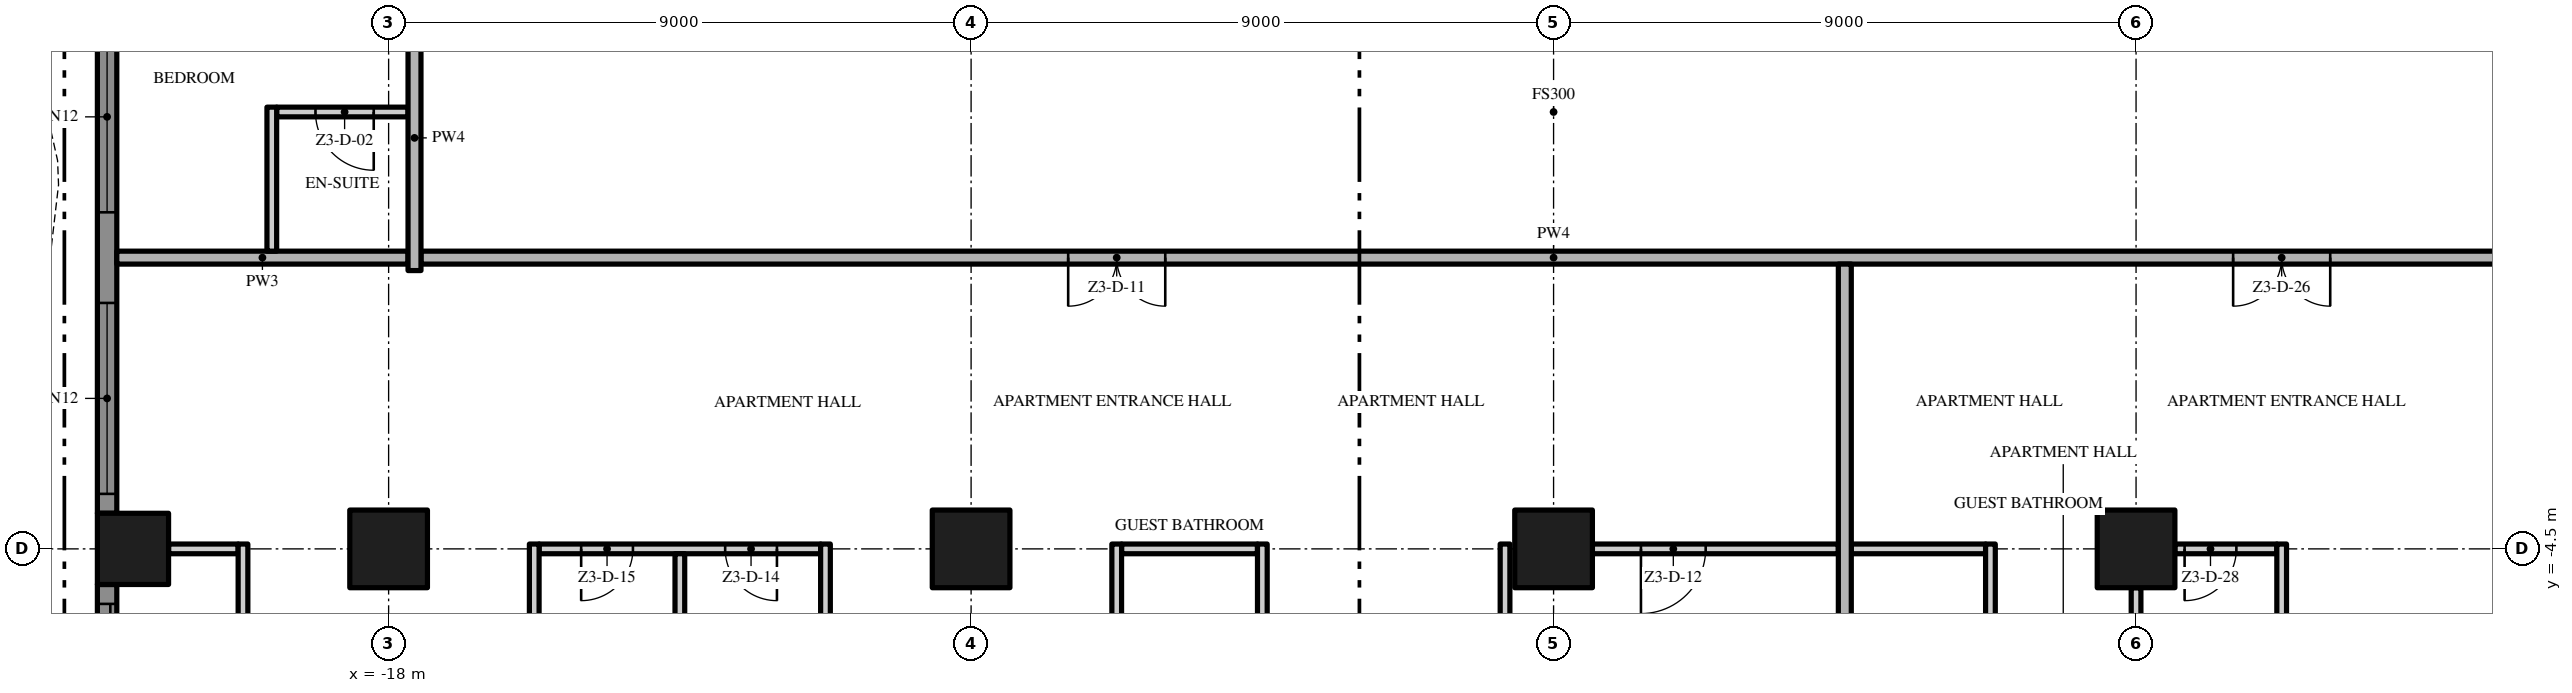
"""IFC4 building model, lengths in metres.
Left out: names, types, materials, properties, quantities, classifications, styles, units other than length and angle.
Written with IfcOpenShell. Run it as: python <this file> out.ifc"""

import sys

from ifc_helpers import new_model, si_unit, direction, frame, frame_2d, origin, origin_2d, place, context, subcontext, project, spatial, polyline, rectangle, outline, extrude, element, fill, save


model = new_model("IFC4")
c1 = context("Model", 3, precision=1e-05, world=origin(), true_north=direction((0.0, 1.0)))
c2 = subcontext(c1, "Body", "Model", "MODEL_VIEW")
j1 = project(units=[si_unit("LENGTHUNIT", "METRE"), si_unit("PLANEANGLEUNIT", "RADIAN")], contexts=[c1])
p1 = place(None, origin())
s1 = spatial("IfcSite", under=j1, at=p1, CompositionType="ELEMENT")
p2 = place(p1, origin())
s2 = spatial("IfcBuilding", under=s1, at=p2, CompositionType="ELEMENT")
p3 = place(p2, frame((0.0, 0.0, 163.0)))
s3 = spatial("IfcBuildingStorey", under=s2, at=p3, CompositionType="ELEMENT", Elevation=163.0)
p4 = place(p3, frame((-18.0, -4.5, 0.0), z_axis=(0.0, 0.0, 1.0), x_axis=(1.0, 0.0, 0.0)))
e1 = element("IfcColumn", 1, at=p4, inside=s3, PredefinedType="COLUMN", context=c2, shape_type="SweptSolid", body=[
    extrude(rectangle(XDim=1.2, YDim=1.2, at=origin_2d()), origin(), (0.0, 0.0, 1.0), 3.5),
])
p5 = place(p3, frame((-21.95, -4.5, 0.0), z_axis=(0.0, 0.0, 1.0), x_axis=(1.0, 0.0, 0.0)))
e2 = element("IfcColumn", 2, at=p5, inside=s3, PredefinedType="COLUMN", context=c2, shape_type="SweptSolid", body=[
    extrude(rectangle(XDim=1.1, YDim=1.1, at=origin_2d()), origin(), (0.0, 0.0, 1.0), 3.5),
])
for number, where, z_axis, x_axis in (
    (3, (-9.0, -4.5, 0.0), (0.0, 0.0, 1.0), (1.0, 0.0, 0.0)),
    (4, (0.0, -4.5, 0.0), (0.0, 0.0, 1.0), (1.0, 0.0, 0.0)),
    (5, (9.0, -4.5, 0.0), (0.0, 0.0, 1.0), (1.0, 0.0, 0.0)),
):
    element("IfcColumn", number, at=place(p3, frame(where, z_axis=z_axis, x_axis=x_axis)), inside=s3, PredefinedType="COLUMN", context=c2, shape_type="SweptSolid", body=[
        extrude(rectangle(XDim=1.2, YDim=1.2, at=origin_2d()), origin(), (0.0, 0.0, 1.0), 3.5),
    ])
p6 = place(p3, frame((-22.35, -3.95, 0.0), z_axis=(0.0, 0.0, 1.0), x_axis=(0.0, 1.0, 0.0)))
e6 = element("IfcWall", 6, at=p6, inside=s3, PredefinedType="SOLIDWALL", context=c2, shape_type="SweptSolid", body=[
    extrude(rectangle(XDim=7.9, YDim=0.3, at=frame_2d((3.95, 0.0))), origin(), (0.0, 0.0, 1.0), 3.5),
])
p7 = place(p6, frame((4.65, 0.0, 0.45)))
e7 = element("IfcOpeningElement", 7, at=p7, cuts=e6, PredefinedType="OPENING", context=c2, shape_type="SweptSolid", body=[
    extrude(rectangle(XDim=2.95, YDim=2.65, at=frame_2d((1.475, 1.325))), frame((0.0, 0.16, 0.0), z_axis=(0.0, -1.0, 0.0), x_axis=(1.0, 0.0, 0.0)), (0.0, 0.0, 1.0), 0.32),
])
p8 = place(p6, frame((0.3, 0.0, 0.45)))
e8 = element("IfcOpeningElement", 8, at=p8, cuts=e6, PredefinedType="OPENING", context=c2, shape_type="SweptSolid", body=[
    extrude(rectangle(XDim=2.95, YDim=2.65, at=frame_2d((1.475, 1.325))), frame((0.0, 0.16, 0.0), z_axis=(0.0, -1.0, 0.0), x_axis=(1.0, 0.0, 0.0)), (0.0, 0.0, 1.0), 0.32),
])
p9 = place(p3, frame((-22.35, -12.4, 0.0), z_axis=(0.0, 0.0, 1.0), x_axis=(0.0, 1.0, 0.0)))
e9 = element("IfcWall", 9, at=p9, inside=s3, PredefinedType="SOLIDWALL", context=c2, shape_type="SweptSolid", body=[
    extrude(rectangle(XDim=7.35, YDim=0.3, at=frame_2d((3.675, 0.0))), origin(), (0.0, 0.0, 1.0), 3.5),
])
p10 = place(p9, frame((4.1, 0.0, 0.0)))
e10 = element("IfcOpeningElement", 10, at=p10, cuts=e9, PredefinedType="OPENING", context=c2, shape_type="SweptSolid", body=[
    extrude(rectangle(XDim=2.95, YDim=2.4, at=frame_2d((1.475, 1.2))), frame((0.0, 0.16, 0.0), z_axis=(0.0, -1.0, 0.0), x_axis=(1.0, 0.0, 0.0)), (0.0, 0.0, 1.0), 0.32),
])
p11 = place(p9, frame((0.3, 0.0, 0.45)))
e11 = element("IfcOpeningElement", 11, at=p11, cuts=e9, PredefinedType="OPENING", context=c2, shape_type="SweptSolid", body=[
    extrude(rectangle(XDim=2.4, YDim=2.65, at=frame_2d((1.2, 1.325))), frame((0.0, 0.16, 0.0), z_axis=(0.0, -1.0, 0.0), x_axis=(1.0, 0.0, 0.0)), (0.0, 0.0, 1.0), 0.32),
])
p12 = place(p3, origin())
e12 = element("IfcWall", 12, at=p12, inside=s3, PredefinedType="USERDEFINED", context=c2, shape_type="SweptSolid", body=[
    extrude(outline(polyline([(-23.451, 18.0), (-23.115, 16.5), (-23.1, 16.125), (-23.231, 15.0), (-23.755, 13.5), (-24.488, 12.0), (-25.149, 10.5), (-25.485, 9.0), (-25.5, 8.625), (-25.369, 7.5), (-24.845, 6.0), (-24.112, 4.5), (-23.451, 3.0), (-23.115, 1.5), (-23.1, 1.125), (-23.231, 0.0), (-23.755, -1.5), (-24.488, -3.0), (-25.149, -4.5), (-25.485, -6.0), (-25.5, -6.375), (-25.369, -7.5), (-24.845, -9.0), (-24.112, -10.5), (-23.451, -12.0), (-23.115, -13.5), (-22.871, -13.445), (-23.213, -11.921), (-23.885, -10.395), (-24.614, -8.904), (-25.124, -7.444), (-25.249, -6.365), (-25.236, -6.033), (-24.91, -4.579), (-24.261, -3.105), (-23.524, -1.596), (-22.986, -0.056), (-22.849, 1.115), (-22.866, 1.533), (-23.213, 3.079), (-23.885, 4.605), (-24.614, 6.096), (-25.124, 7.556), (-25.249, 8.635), (-25.236, 8.967), (-24.91, 10.421), (-24.261, 11.895), (-23.524, 13.404), (-22.986, 14.944), (-22.849, 16.115), (-22.866, 16.533), (-23.208, 18.055), (-23.451, 18.0)])), origin(), (0.0, 0.0, 1.0), 0.9),
])
p13 = place(p3, frame((-21.4, -4.5, 0.0), z_axis=(0.0, 0.0, 1.0), x_axis=(1.0, 0.0, 0.0)))
e13 = element("IfcWall", 13, at=p13, inside=s3, PredefinedType="PARTITIONING", context=c2, shape_type="SweptSolid", body=[
    extrude(rectangle(XDim=1.075, YDim=0.15, at=frame_2d((0.537, 0.0))), origin(), (0.0, 0.0, 1.0), 3.5),
])
p14 = place(p3, frame((-11.325, -4.5, 0.0), z_axis=(0.0, 0.0, 1.0), x_axis=(-1.0, 0.0, 0.0)))
e14 = element("IfcWall", 14, at=p14, inside=s3, PredefinedType="PARTITIONING", context=c2, shape_type="SweptSolid", body=[
    extrude(rectangle(XDim=4.35, YDim=0.15, at=frame_2d((2.175, 0.0))), origin(), (0.0, 0.0, 1.0), 3.5),
])
p15 = place(p14, frame((0.675, 0.0, 0.0)))
e15 = element("IfcOpeningElement", 15, at=p15, cuts=e14, PredefinedType="OPENING", context=c2, shape_type="SweptSolid", body=[
    extrude(rectangle(XDim=0.8, YDim=2.0, at=frame_2d((0.4, 1.0))), frame((0.0, 0.085, 0.0), z_axis=(0.0, -1.0, 0.0), x_axis=(1.0, 0.0, 0.0)), (0.0, 0.0, 1.0), 0.17),
])
p16 = place(p14, frame((2.9, 0.0, 0.0)))
e16 = element("IfcOpeningElement", 16, at=p16, cuts=e14, PredefinedType="OPENING", context=c2, shape_type="SweptSolid", body=[
    extrude(rectangle(XDim=0.8, YDim=2.0, at=frame_2d((0.4, 1.0))), frame((0.0, 0.085, 0.0), z_axis=(0.0, -1.0, 0.0), x_axis=(1.0, 0.0, 0.0)), (0.0, 0.0, 1.0), 0.17),
])
p17 = place(p3, frame((-6.675, -4.5, 0.0), z_axis=(0.0, 0.0, 1.0), x_axis=(1.0, 0.0, 0.0)))
e17 = element("IfcWall", 17, at=p17, inside=s3, PredefinedType="PARTITIONING", context=c2, shape_type="SweptSolid", body=[
    extrude(rectangle(XDim=2.1, YDim=0.15, at=frame_2d((1.05, 0.0))), origin(), (0.0, 0.0, 1.0), 3.5),
])
p18 = place(p3, frame((4.4, -4.5, 0.0), z_axis=(0.0, 0.0, 1.0), x_axis=(-1.0, 0.0, 0.0)))
e18 = element("IfcWall", 18, at=p18, inside=s3, PredefinedType="PARTITIONING", context=c2, shape_type="SweptSolid", body=[
    extrude(rectangle(XDim=3.8, YDim=0.15, at=frame_2d((1.9, 0.0))), origin(), (0.0, 0.0, 1.0), 3.5),
])
p19 = place(p18, frame((2.05, 0.0, 0.0)))
e19 = element("IfcOpeningElement", 19, at=p19, cuts=e18, PredefinedType="OPENING", context=c2, shape_type="SweptSolid", body=[
    extrude(rectangle(XDim=1.0, YDim=2.4, at=frame_2d((0.5, 1.2))), frame((0.0, 0.085, 0.0), z_axis=(0.0, -1.0, 0.0), x_axis=(1.0, 0.0, 0.0)), (0.0, 0.0, 1.0), 0.17),
])
p20 = place(p3, frame((4.6, -4.5, 0.0), z_axis=(0.0, 0.0, 1.0), x_axis=(1.0, 0.0, 0.0)))
e20 = element("IfcWall", 20, at=p20, inside=s3, PredefinedType="PARTITIONING", context=c2, shape_type="SweptSolid", body=[
    extrude(rectangle(XDim=2.075, YDim=0.15, at=frame_2d((1.038, 0.0))), origin(), (0.0, 0.0, 1.0), 3.5),
])
p21 = place(p3, frame((11.175, -4.5, 0.0), z_axis=(0.0, 0.0, 1.0), x_axis=(-1.0, 0.0, 0.0)))
e21 = element("IfcWall", 21, at=p21, inside=s3, PredefinedType="PARTITIONING", context=c2, shape_type="SweptSolid", body=[
    extrude(rectangle(XDim=1.575, YDim=0.15, at=frame_2d((0.787, 0.0))), origin(), (0.0, 0.0, 1.0), 3.5),
])
p22 = place(p21, frame((0.625, 0.0, 0.0)))
e22 = element("IfcOpeningElement", 22, at=p22, cuts=e21, PredefinedType="OPENING", context=c2, shape_type="SweptSolid", body=[
    extrude(rectangle(XDim=0.8, YDim=2.0, at=frame_2d((0.4, 1.0))), frame((0.0, 0.085, 0.0), z_axis=(0.0, -1.0, 0.0), x_axis=(1.0, 0.0, 0.0)), (0.0, 0.0, 1.0), 0.17),
])
p23 = place(p3, frame((17.5, 0.0, 0.0), z_axis=(0.0, 0.0, 1.0), x_axis=(-1.0, 0.0, 0.0)))
e23 = element("IfcWall", 23, at=p23, inside=s3, PredefinedType="PARTITIONING", context=c2, shape_type="SweptSolid", body=[
    extrude(rectangle(XDim=35.0, YDim=0.2, at=frame_2d((17.5, 0.0))), origin(), (0.0, 0.0, 1.0), 3.5),
])
p24 = place(p23, frame((23.5, 0.0, 0.0)))
e24 = element("IfcOpeningElement", 24, at=p24, cuts=e23, PredefinedType="OPENING", context=c2, shape_type="SweptSolid", body=[
    extrude(rectangle(XDim=1.5, YDim=2.4, at=frame_2d((0.75, 1.2))), frame((0.0, 0.11, 0.0), z_axis=(0.0, -1.0, 0.0), x_axis=(1.0, 0.0, 0.0)), (0.0, 0.0, 1.0), 0.22),
])
p25 = place(p23, frame((5.5, 0.0, 0.0)))
e25 = element("IfcOpeningElement", 25, at=p25, cuts=e23, PredefinedType="OPENING", context=c2, shape_type="SweptSolid", body=[
    extrude(rectangle(XDim=1.5, YDim=2.4, at=frame_2d((0.75, 1.2))), frame((0.0, 0.11, 0.0), z_axis=(0.0, -1.0, 0.0), x_axis=(1.0, 0.0, 0.0)), (0.0, 0.0, 1.0), 0.22),
])
p26 = place(p3, frame((-22.2, 0.0, 0.0), z_axis=(0.0, 0.0, 1.0), x_axis=(1.0, 0.0, 0.0)))
e26 = element("IfcWall", 26, at=p26, inside=s3, PredefinedType="PARTITIONING", context=c2, shape_type="SweptSolid", body=[
    extrude(rectangle(XDim=4.5, YDim=0.2, at=frame_2d((2.25, 0.0))), origin(), (0.0, 0.0, 1.0), 3.5),
])
p27 = place(p3, frame((-17.7, 2.25, 0.0), z_axis=(0.0, 0.0, 1.0), x_axis=(-1.0, 0.0, 0.0)))
e27 = element("IfcWall", 27, at=p27, inside=s3, PredefinedType="PARTITIONING", context=c2, shape_type="SweptSolid", body=[
    extrude(rectangle(XDim=2.03, YDim=0.15, at=frame_2d((1.015, 0.0))), origin(), (0.0, 0.0, 1.0), 3.5),
])
p28 = place(p27, frame((0.53, 0.0, 0.0)))
e28 = element("IfcOpeningElement", 28, at=p28, cuts=e27, PredefinedType="OPENING", context=c2, shape_type="SweptSolid", body=[
    extrude(rectangle(XDim=0.9, YDim=2.1, at=frame_2d((0.45, 1.05))), frame((0.0, 0.085, 0.0), z_axis=(0.0, -1.0, 0.0), x_axis=(1.0, 0.0, 0.0)), (0.0, 0.0, 1.0), 0.17),
])
p29 = place(p3, frame((-20.25, -8.925, 0.0), z_axis=(0.0, 0.0, 1.0), x_axis=(0.0, 1.0, 0.0)))
e29 = element("IfcWall", 29, at=p29, inside=s3, PredefinedType="PARTITIONING", context=c2, shape_type="SweptSolid", body=[
    extrude(rectangle(XDim=4.5, YDim=0.15, at=frame_2d((2.25, 0.0))), origin(), (0.0, 0.0, 1.0), 3.5),
])
p30 = place(p29, frame((1.75, 0.0, 0.0)))
e30 = element("IfcOpeningElement", 30, at=p30, cuts=e29, PredefinedType="OPENING", context=c2, shape_type="SweptSolid", body=[
    extrude(rectangle(XDim=0.9, YDim=2.1, at=frame_2d((0.45, 1.05))), frame((0.0, 0.085, 0.0), z_axis=(0.0, -1.0, 0.0), x_axis=(1.0, 0.0, 0.0)), (0.0, 0.0, 1.0), 0.17),
])
p31 = place(p3, frame((-19.805, 0.1, 0.0), z_axis=(0.0, 0.0, 1.0), x_axis=(0.0, 1.0, 0.0)))
e31 = element("IfcWall", 31, at=p31, inside=s3, PredefinedType="PARTITIONING", context=c2, shape_type="SweptSolid", body=[
    extrude(rectangle(XDim=2.225, YDim=0.15, at=frame_2d((1.113, 0.0))), origin(), (0.0, 0.0, 1.0), 3.5),
])
p32 = place(p3, frame((-17.6, -0.2, 0.0), z_axis=(0.0, 0.0, 1.0), x_axis=(0.0, 1.0, 0.0)))
e32 = element("IfcWall", 32, at=p32, inside=s3, PredefinedType="PARTITIONING", context=c2, shape_type="SweptSolid", body=[
    extrude(rectangle(XDim=4.1, YDim=0.2, at=frame_2d((2.05, 0.0))), origin(), (0.0, 0.0, 1.0), 3.5),
])
p33 = place(p3, frame((-15.75, -12.075, 0.0), z_axis=(0.0, 0.0, 1.0), x_axis=(0.0, 1.0, 0.0)))
e33 = element("IfcWall", 33, at=p33, inside=s3, PredefinedType="PARTITIONING", context=c2, shape_type="SweptSolid", body=[
    extrude(rectangle(XDim=7.65, YDim=0.15, at=frame_2d((3.825, 0.0))), origin(), (0.0, 0.0, 1.0), 3.5),
])
p34 = place(p3, frame((-13.5, -17.7, 0.0), z_axis=(0.0, 0.0, 1.0), x_axis=(0.0, 1.0, 0.0)))
e34 = element("IfcWall", 34, at=p34, inside=s3, PredefinedType="PARTITIONING", context=c2, shape_type="SweptSolid", body=[
    extrude(rectangle(XDim=13.125, YDim=0.15, at=frame_2d((6.562, 0.0))), origin(), (0.0, 0.0, 1.0), 3.5),
])
for number, where, z_axis, x_axis in (
    (35, (-11.25, -12.075, 0.0), (0.0, 0.0, 1.0), (0.0, 1.0, 0.0)),
    (36, (-6.75, -12.075, 0.0), (0.0, 0.0, 1.0), (0.0, 1.0, 0.0)),
):
    element("IfcWall", number, at=place(p3, frame(where, z_axis=z_axis, x_axis=x_axis)), inside=s3, PredefinedType="PARTITIONING", context=c2, shape_type="SweptSolid", body=[
        extrude(rectangle(XDim=7.65, YDim=0.15, at=frame_2d((3.825, 0.0))), origin(), (0.0, 0.0, 1.0), 3.5),
    ])
p35 = place(p3, frame((-4.5, -17.7, 0.0), z_axis=(0.0, 0.0, 1.0), x_axis=(0.0, 1.0, 0.0)))
e37 = element("IfcWall", 37, at=p35, inside=s3, PredefinedType="PARTITIONING", context=c2, shape_type="SweptSolid", body=[
    extrude(rectangle(XDim=13.275, YDim=0.15, at=frame_2d((6.638, 0.0))), origin(), (0.0, 0.0, 1.0), 3.5),
])
p36 = place(p35, frame((10.5, 0.0, 0.0)))
e38 = element("IfcOpeningElement", 38, at=p36, cuts=e37, PredefinedType="OPENING", context=c2, shape_type="SweptSolid", body=[
    extrude(rectangle(XDim=0.9, YDim=2.1, at=frame_2d((0.45, 1.05))), frame((0.0, 0.085, 0.0), z_axis=(0.0, -1.0, 0.0), x_axis=(1.0, 0.0, 0.0)), (0.0, 0.0, 1.0), 0.17),
])
p37 = place(p3, frame((-0.75, -8.925, 0.0), z_axis=(0.0, 0.0, 1.0), x_axis=(0.0, 1.0, 0.0)))
e39 = element("IfcWall", 39, at=p37, inside=s3, PredefinedType="PARTITIONING", context=c2, shape_type="SweptSolid", body=[
    extrude(rectangle(XDim=4.5, YDim=0.15, at=frame_2d((2.25, 0.0))), origin(), (0.0, 0.0, 1.0), 3.5),
])
p38 = place(p3, frame((4.5, -17.7, 0.0), z_axis=(0.0, 0.0, 1.0), x_axis=(0.0, 1.0, 0.0)))
e40 = element("IfcWall", 40, at=p38, inside=s3, PredefinedType="PARTITIONING", context=c2, shape_type="SweptSolid", body=[
    extrude(rectangle(XDim=17.6, YDim=0.2, at=frame_2d((8.8, 0.0))), origin(), (0.0, 0.0, 1.0), 3.5),
])
p39 = place(p3, frame((6.75, -12.075, 0.0), z_axis=(0.0, 0.0, 1.0), x_axis=(0.0, 1.0, 0.0)))
e41 = element("IfcWall", 41, at=p39, inside=s3, PredefinedType="PARTITIONING", context=c2, shape_type="SweptSolid", body=[
    extrude(rectangle(XDim=7.65, YDim=0.15, at=frame_2d((3.825, 0.0))), origin(), (0.0, 0.0, 1.0), 3.5),
])
p40 = place(p39, frame((4.875, 0.0, 0.0)))
e42 = element("IfcOpeningElement", 42, at=p40, cuts=e41, PredefinedType="OPENING", context=c2, shape_type="SweptSolid", body=[
    extrude(rectangle(XDim=0.9, YDim=2.1, at=frame_2d((0.45, 1.05))), frame((0.0, 0.085, 0.0), z_axis=(0.0, -1.0, 0.0), x_axis=(1.0, 0.0, 0.0)), (0.0, 0.0, 1.0), 0.17),
])
p41 = place(p39, frame((1.125, 0.0, 0.0)))
e43 = element("IfcOpeningElement", 43, at=p41, cuts=e41, PredefinedType="OPENING", context=c2, shape_type="SweptSolid", body=[
    extrude(rectangle(XDim=0.9, YDim=2.1, at=frame_2d((0.45, 1.05))), frame((0.0, 0.085, 0.0), z_axis=(0.0, -1.0, 0.0), x_axis=(1.0, 0.0, 0.0)), (0.0, 0.0, 1.0), 0.17),
])
p42 = place(p3, frame((9.0, -12.9, 0.0), z_axis=(0.0, 0.0, 1.0), x_axis=(0.0, 1.0, 0.0)))
e44 = element("IfcWall", 44, at=p42, inside=s3, PredefinedType="PARTITIONING", context=c2, shape_type="SweptSolid", body=[
    extrude(rectangle(XDim=7.8, YDim=0.15, at=frame_2d((3.9, 0.0))), origin(), (0.0, 0.0, 1.0), 3.5),
])
p43 = place(p3, frame((11.25, -12.075, 0.0), z_axis=(0.0, 0.0, 1.0), x_axis=(0.0, 1.0, 0.0)))
e45 = element("IfcWall", 45, at=p43, inside=s3, PredefinedType="PARTITIONING", context=c2, shape_type="SweptSolid", body=[
    extrude(rectangle(XDim=7.65, YDim=0.15, at=frame_2d((3.825, 0.0))), origin(), (0.0, 0.0, 1.0), 3.5),
])
p44 = place(p7, origin())
e46 = element("IfcWindow", 46, at=p44, inside=s3, PartitioningType="SINGLE_PANEL", PredefinedType="WINDOW", context=c2, shape_type="SweptSolid", body=[
    extrude(rectangle(XDim=2.95, YDim=2.65, at=frame_2d((1.475, 1.325))), frame((0.0, 0.03, 0.0), z_axis=(0.0, -1.0, 0.0), x_axis=(1.0, 0.0, 0.0)), (0.0, 0.0, 1.0), 0.06),
])
fill(e7, e46)
p45 = place(p8, origin())
e47 = element("IfcWindow", 47, at=p45, inside=s3, PartitioningType="SINGLE_PANEL", PredefinedType="WINDOW", context=c2, shape_type="SweptSolid", body=[
    extrude(rectangle(XDim=2.95, YDim=2.65, at=frame_2d((1.475, 1.325))), frame((0.0, 0.03, 0.0), z_axis=(0.0, -1.0, 0.0), x_axis=(1.0, 0.0, 0.0)), (0.0, 0.0, 1.0), 0.06),
])
fill(e8, e47)
p46 = place(p10, origin())
e48 = element("IfcDoor", 48, at=p46, inside=s3, OperationType="SINGLE_SWING_LEFT", PredefinedType="DOOR", context=c2, shape_type="SweptSolid", body=[
    extrude(rectangle(XDim=2.95, YDim=2.4, at=frame_2d((1.475, 1.2))), frame((0.0, 0.025, 0.0), z_axis=(0.0, -1.0, 0.0), x_axis=(1.0, 0.0, 0.0)), (0.0, 0.0, 1.0), 0.05),
])
fill(e10, e48)
p47 = place(p28, origin())
e49 = element("IfcDoor", 49, at=p47, inside=s3, OperationType="SINGLE_SWING_LEFT", PredefinedType="DOOR", context=c2, shape_type="SweptSolid", body=[
    extrude(rectangle(XDim=0.9, YDim=2.1, at=frame_2d((0.45, 1.05))), frame((0.0, 0.025, 0.0), z_axis=(0.0, -1.0, 0.0), x_axis=(1.0, 0.0, 0.0)), (0.0, 0.0, 1.0), 0.05),
])
fill(e28, e49)
p48 = place(p24, origin())
e50 = element("IfcDoor", 50, at=p48, inside=s3, OperationType="DOUBLE_DOOR_SINGLE_SWING", PredefinedType="DOOR", context=c2, shape_type="SweptSolid", body=[
    extrude(rectangle(XDim=1.5, YDim=2.4, at=frame_2d((0.75, 1.2))), frame((0.0, 0.025, 0.0), z_axis=(0.0, -1.0, 0.0), x_axis=(1.0, 0.0, 0.0)), (0.0, 0.0, 1.0), 0.05),
])
fill(e24, e50)
p49 = place(p19, origin())
e51 = element("IfcDoor", 51, at=p49, inside=s3, OperationType="SINGLE_SWING_RIGHT", PredefinedType="DOOR", context=c2, shape_type="SweptSolid", body=[
    extrude(rectangle(XDim=1.0, YDim=2.4, at=frame_2d((0.5, 1.2))), frame((0.0, 0.025, 0.0), z_axis=(0.0, -1.0, 0.0), x_axis=(1.0, 0.0, 0.0)), (0.0, 0.0, 1.0), 0.05),
])
fill(e19, e51)
p50 = place(p15, origin())
e52 = element("IfcDoor", 52, at=p50, inside=s3, OperationType="SINGLE_SWING_LEFT", PredefinedType="DOOR", context=c2, shape_type="SweptSolid", body=[
    extrude(rectangle(XDim=0.8, YDim=2.0, at=frame_2d((0.4, 1.0))), frame((0.0, 0.025, 0.0), z_axis=(0.0, -1.0, 0.0), x_axis=(1.0, 0.0, 0.0)), (0.0, 0.0, 1.0), 0.05),
])
fill(e15, e52)
p51 = place(p16, origin())
e53 = element("IfcDoor", 53, at=p51, inside=s3, OperationType="SINGLE_SWING_RIGHT", PredefinedType="DOOR", context=c2, shape_type="SweptSolid", body=[
    extrude(rectangle(XDim=0.8, YDim=2.0, at=frame_2d((0.4, 1.0))), frame((0.0, 0.025, 0.0), z_axis=(0.0, -1.0, 0.0), x_axis=(1.0, 0.0, 0.0)), (0.0, 0.0, 1.0), 0.05),
])
fill(e16, e53)
p52 = place(p25, origin())
e54 = element("IfcDoor", 54, at=p52, inside=s3, OperationType="DOUBLE_DOOR_SINGLE_SWING", PredefinedType="DOOR", context=c2, shape_type="SweptSolid", body=[
    extrude(rectangle(XDim=1.5, YDim=2.4, at=frame_2d((0.75, 1.2))), frame((0.0, 0.025, 0.0), z_axis=(0.0, -1.0, 0.0), x_axis=(1.0, 0.0, 0.0)), (0.0, 0.0, 1.0), 0.05),
])
fill(e25, e54)
p53 = place(p22, origin())
e55 = element("IfcDoor", 55, at=p53, inside=s3, OperationType="SINGLE_SWING_RIGHT", PredefinedType="DOOR", context=c2, shape_type="SweptSolid", body=[
    extrude(rectangle(XDim=0.8, YDim=2.0, at=frame_2d((0.4, 1.0))), frame((0.0, 0.025, 0.0), z_axis=(0.0, -1.0, 0.0), x_axis=(1.0, 0.0, 0.0)), (0.0, 0.0, 1.0), 0.05),
])
fill(e22, e55)
save(model, sys.argv[1])
